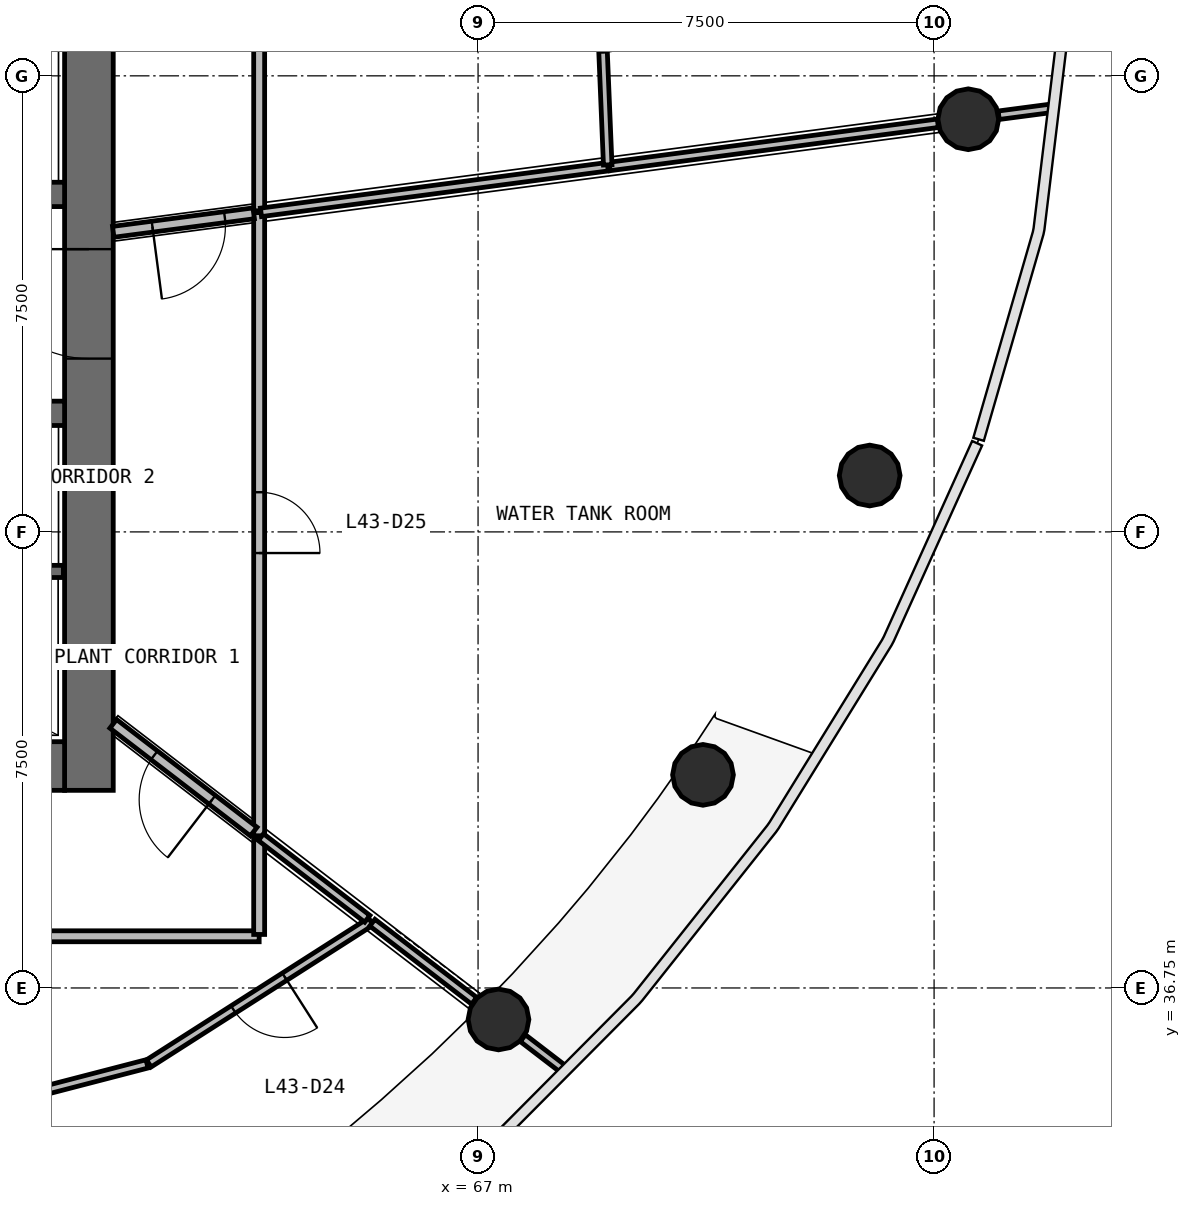
"""IFC4 building model, lengths in metres.
Left out: names, types, materials, properties, quantities, classifications, styles, units other than length and angle.
Written with IfcOpenShell. Run it as: python <this file> out.ifc"""

import sys

from ifc_helpers import new_model, si_unit, direction, frame, frame_2d, origin, origin_2d, place, context, subcontext, project, spatial, rectangle, circle, extrude, source, transform, mapped, element, fill, save


model = new_model("IFC4")
c1 = context("Model", 3, precision=1e-05, world=origin(), true_north=direction((0.0, 1.0)))
c2 = subcontext(c1, "Body", "Model", "MODEL_VIEW")
j1 = project(units=[si_unit("LENGTHUNIT", "METRE"), si_unit("PLANEANGLEUNIT", "RADIAN")], contexts=[c1])
p1 = place(None, origin())
s1 = spatial("IfcSite", under=j1, at=p1, CompositionType="ELEMENT")
p2 = place(p1, origin())
s2 = spatial("IfcBuilding", under=s1, at=p2, CompositionType="ELEMENT")
p3 = place(p2, frame((0.0, 0.0, 179.9)))
s3 = spatial("IfcBuildingStorey", under=s2, at=p3, CompositionType="ELEMENT", Elevation=179.9)
p4 = place(p3, frame((60.6, 40.0, 0.0), z_axis=(0.0, 0.0, 1.0), x_axis=(0.0, 1.0, 0.0)))
e1 = element("IfcWall", 1, at=p4, inside=s3, PredefinedType="SHEAR", context=c2, shape_type="SweptSolid", body=[
    extrude(rectangle(XDim=16.0, YDim=0.8, at=frame_2d((8.0, 0.0))), origin(), (0.0, 0.0, 1.0), 3.9),
])
p5 = place(p4, frame((7.1, 0.0, 0.0)))
e2 = element("IfcOpeningElement", 2, at=p5, cuts=e1, PredefinedType="OPENING", context=c2, shape_type="SweptSolid", body=[
    extrude(rectangle(XDim=1.8, YDim=2.1, at=frame_2d((0.9, 1.05))), frame((0.0, 0.41, 0.0), z_axis=(0.0, -1.0, 0.0), x_axis=(1.0, 0.0, 0.0)), (0.0, 0.0, 1.0), 0.82),
])
p6 = place(p3, frame((43.8, 40.4, 0.0), z_axis=(0.0, 0.0, 1.0), x_axis=(1.0, 0.0, 0.0)))
e3 = element("IfcWall", 3, at=p6, inside=s3, PredefinedType="SHEAR", context=c2, shape_type="SweptSolid", body=[
    extrude(rectangle(XDim=16.4, YDim=0.8, at=frame_2d((8.2, 0.0))), origin(), (0.0, 0.0, 1.0), 3.9),
])
p7 = place(p6, frame((10.1, 0.0, 0.0)))
e4 = element("IfcOpeningElement", 4, at=p7, cuts=e3, PredefinedType="OPENING", context=c2, shape_type="SweptSolid", body=[
    extrude(rectangle(XDim=1.2, YDim=2.1, at=frame_2d((0.6, 1.05))), frame((0.0, 0.41, 0.0), z_axis=(0.0, -1.0, 0.0), x_axis=(1.0, 0.0, 0.0)), (0.0, 0.0, 1.0), 0.82),
])
p8 = place(p6, frame((7.05, 0.0, 0.0)))
e5 = element("IfcOpeningElement", 5, at=p8, cuts=e3, PredefinedType="OPENING", context=c2, shape_type="SweptSolid", body=[
    extrude(rectangle(XDim=1.1, YDim=2.1, at=frame_2d((0.55, 1.05))), frame((0.0, 0.41, 0.0), z_axis=(0.0, -1.0, 0.0), x_axis=(1.0, 0.0, 0.0)), (0.0, 0.0, 1.0), 0.82),
])
p9 = place(p6, frame((0.5, 0.0, 0.0)))
e6 = element("IfcOpeningElement", 6, at=p9, cuts=e3, PredefinedType="OPENING", context=c2, shape_type="SweptSolid", body=[
    extrude(rectangle(XDim=0.8, YDim=2.1, at=frame_2d((0.4, 1.05))), frame((0.0, 0.41, 0.0), z_axis=(0.0, -1.0, 0.0), x_axis=(1.0, 0.0, 0.0)), (0.0, 0.0, 1.0), 0.82),
])
p10 = place(p3, frame((43.8, 49.8, 0.0), z_axis=(0.0, 0.0, 1.0), x_axis=(1.0, 0.0, 0.0)))
e7 = element("IfcWall", 7, at=p10, inside=s3, PredefinedType="SHEAR", context=c2, shape_type="SweptSolid", body=[
    extrude(rectangle(XDim=16.4, YDim=0.4, at=frame_2d((8.2, 0.0))), origin(), (0.0, 0.0, 1.0), 3.9),
])
p11 = place(p10, frame((3.45, 0.0, 0.0)))
e8 = element("IfcOpeningElement", 8, at=p11, cuts=e7, PredefinedType="OPENING", context=c2, shape_type="SweptSolid", body=[
    extrude(rectangle(XDim=0.9, YDim=2.1, at=frame_2d((0.45, 1.05))), frame((0.0, 0.21, 0.0), z_axis=(0.0, -1.0, 0.0), x_axis=(1.0, 0.0, 0.0)), (0.0, 0.0, 1.0), 0.42),
])
p12 = place(p10, frame((7.65, 0.0, 0.0)))
e9 = element("IfcOpeningElement", 9, at=p12, cuts=e7, PredefinedType="OPENING", context=c2, shape_type="SweptSolid", body=[
    extrude(rectangle(XDim=0.9, YDim=2.1, at=frame_2d((0.45, 1.05))), frame((0.0, 0.21, 0.0), z_axis=(0.0, -1.0, 0.0), x_axis=(1.0, 0.0, 0.0)), (0.0, 0.0, 1.0), 0.42),
])
p13 = place(p3, frame((43.8, 46.2, 0.0), z_axis=(0.0, 0.0, 1.0), x_axis=(1.0, 0.0, 0.0)))
e10 = element("IfcWall", 10, at=p13, inside=s3, PredefinedType="SHEAR", context=c2, shape_type="SweptSolid", body=[
    extrude(rectangle(XDim=16.4, YDim=0.4, at=frame_2d((8.2, 0.0))), origin(), (0.0, 0.0, 1.0), 3.9),
])
p14 = place(p13, frame((2.45, 0.0, 0.0)))
e11 = element("IfcOpeningElement", 11, at=p14, cuts=e10, PredefinedType="OPENING", context=c2, shape_type="SweptSolid", body=[
    extrude(rectangle(XDim=0.9, YDim=2.1, at=frame_2d((0.45, 1.05))), frame((0.0, 0.21, 0.0), z_axis=(0.0, -1.0, 0.0), x_axis=(1.0, 0.0, 0.0)), (0.0, 0.0, 1.0), 0.42),
])
p15 = place(p13, frame((7.65, 0.0, 0.0)))
e12 = element("IfcOpeningElement", 12, at=p15, cuts=e10, PredefinedType="OPENING", context=c2, shape_type="SweptSolid", body=[
    extrude(rectangle(XDim=0.9, YDim=2.1, at=frame_2d((0.45, 1.05))), frame((0.0, 0.21, 0.0), z_axis=(0.0, -1.0, 0.0), x_axis=(1.0, 0.0, 0.0)), (0.0, 0.0, 1.0), 0.42),
])
m1 = source(origin(), c2, "Body", "SweptSolid", [
    extrude(circle(Radius=0.5, at=origin_2d()), origin(), (0.0, 0.0, 1.0), 3.58),
])
for number, where, z_axis, x_axis in (
    (13, (75.062, 51.036, 0.0), (0.0, 0.0, 1.0), (1.0, 0.0, 0.0)),
    (14, (67.336, 36.232, 0.0), (0.0, 0.0, 1.0), (1.0, 0.0, 0.0)),
    (15, (70.699, 40.254, 0.0), (0.0, 0.0, 1.0), (1.0, 0.0, 0.0)),
    (16, (73.441, 45.177, 0.0), (0.0, 0.0, 1.0), (1.0, 0.0, 0.0)),
):
    element("IfcColumn", number, at=place(p3, frame(where, z_axis=z_axis, x_axis=x_axis)), inside=s3, PredefinedType="COLUMN", context=c2, shape_type="MappedRepresentation", body=[
        mapped(m1, transform((0.0, 0.0, 0.0), scale=1.0)),
    ])
p16 = place(p3, frame((57.73, 43.6, 0.0), z_axis=(0.0, 0.0, 1.0), x_axis=(1.0, 0.0, 0.0)))
e17 = element("IfcWall", 17, at=p16, inside=s3, PredefinedType="SOLIDWALL", context=c2, shape_type="SweptSolid", body=[
    extrude(rectangle(XDim=2.45, YDim=0.2, at=frame_2d((1.225, 0.0))), origin(), (0.0, 0.0, 1.0), 3.58),
])
p17 = place(p3, frame((63.4, 49.501, 0.0), z_axis=(0.0, 0.0, 1.0), x_axis=(0.0, -1.0, 0.0)))
e18 = element("IfcWall", 18, at=p17, inside=s3, PredefinedType="PARTITIONING", context=c2, shape_type="SweptSolid", body=[
    extrude(rectangle(XDim=10.248, YDim=0.18, at=frame_2d((5.124, 0.0))), origin(), (0.0, 0.0, 1.0), 2.38),
])
p18 = place(p17, frame((4.598, 0.0, 0.0)))
e19 = element("IfcOpeningElement", 19, at=p18, cuts=e18, PredefinedType="OPENING", context=c2, shape_type="SweptSolid", body=[
    extrude(rectangle(XDim=1.0, YDim=2.1, at=frame_2d((0.5, 1.05))), frame((0.0, 0.1, 0.0), z_axis=(0.0, -1.0, 0.0), x_axis=(1.0, 0.0, 0.0)), (0.0, 0.0, 1.0), 0.2),
])
p19 = place(p3, frame((63.4, 37.6, 0.0), z_axis=(0.0, 0.0, 1.0), x_axis=(-1.0, 0.0, 0.0)))
e20 = element("IfcWall", 20, at=p19, inside=s3, PredefinedType="PARTITIONING", context=c2, shape_type="SweptSolid", body=[
    extrude(rectangle(XDim=10.031, YDim=0.18, at=frame_2d((5.015, 0.0))), origin(), (0.0, 0.0, 1.0), 2.38),
])
p20 = place(p19, frame((4.581, 0.0, 0.0)))
e21 = element("IfcOpeningElement", 21, at=p20, cuts=e20, PredefinedType="OPENING", context=c2, shape_type="SweptSolid", body=[
    extrude(rectangle(XDim=1.0, YDim=2.1, at=frame_2d((0.5, 1.05))), frame((0.0, 0.1, 0.0), z_axis=(0.0, -1.0, 0.0), x_axis=(1.0, 0.0, 0.0)), (0.0, 0.0, 1.0), 0.2),
])
p21 = place(p3, frame((63.4, 49.531, 0.0), z_axis=(0.0, 0.0, 1.0), x_axis=(0.0, 1.0, 0.0)))
e22 = element("IfcWall", 22, at=p21, inside=s3, PredefinedType="PARTITIONING", context=c2, shape_type="SweptSolid", body=[
    extrude(rectangle(XDim=8.869, YDim=0.18, at=frame_2d((4.435, 0.0))), origin(), (0.0, 0.0, 1.0), 2.38),
])
p22 = place(p3, frame((63.31, 39.322, 0.0), z_axis=(0.0, 0.0, 1.0), x_axis=(-0.793371480341, 0.608737787706, 0.0)))
e23 = element("IfcWall", 23, at=p22, inside=s3, PredefinedType="PARTITIONING", context=c2, shape_type="SweptSolid", body=[
    extrude(rectangle(XDim=2.912, YDim=0.18, at=frame_2d((1.456, 0.0))), origin(), (0.0, 0.0, 1.0), 2.38),
])
p23 = place(p22, frame((0.862, 0.0, 0.0)))
e24 = element("IfcOpeningElement", 24, at=p23, cuts=e23, PredefinedType="OPENING", context=c2, shape_type="SweptSolid", body=[
    extrude(rectangle(XDim=1.2, YDim=2.1, at=frame_2d((0.6, 1.05))), frame((0.0, 0.1, 0.0), z_axis=(0.0, -1.0, 0.0), x_axis=(1.0, 0.0, 0.0)), (0.0, 0.0, 1.0), 0.2),
])
p24 = place(p3, frame((63.31, 49.489, 0.0), z_axis=(0.0, 0.0, 1.0), x_axis=(-0.991440737811, -0.130557509967, 0.0)))
e25 = element("IfcWall", 25, at=p24, inside=s3, PredefinedType="PARTITIONING", context=c2, shape_type="SweptSolid", body=[
    extrude(rectangle(XDim=2.33, YDim=0.18, at=frame_2d((1.165, 0.0))), origin(), (0.0, 0.0, 1.0), 2.38),
])
p25 = place(p24, frame((0.48, 0.0, 0.0)))
e26 = element("IfcOpeningElement", 26, at=p25, cuts=e25, PredefinedType="OPENING", context=c2, shape_type="SweptSolid", body=[
    extrude(rectangle(XDim=1.2, YDim=2.1, at=frame_2d((0.6, 1.05))), frame((0.0, 0.1, 0.0), z_axis=(0.0, -1.0, 0.0), x_axis=(1.0, 0.0, 0.0)), (0.0, 0.0, 1.0), 0.2),
])
p26 = place(p3, frame((63.4, 37.63, 0.0), z_axis=(0.0, 0.0, 1.0), x_axis=(0.0, 1.0, 0.0)))
e27 = element("IfcWall", 27, at=p26, inside=s3, PredefinedType="PARTITIONING", context=c2, shape_type="SweptSolid", body=[
    extrude(rectangle(XDim=1.593, YDim=0.18, at=frame_2d((0.796, 0.0))), origin(), (0.0, 0.0, 1.0), 2.38),
])
p27 = place(p3, frame((63.43, 49.505, 0.0), z_axis=(0.0, 0.0, 1.0), x_axis=(0.991449239368, 0.130492933744, 0.0)))
e28 = element("IfcWall", 28, at=p27, inside=s3, PredefinedType="PARTITIONING", context=c2, shape_type="SweptSolid", body=[
    extrude(rectangle(XDim=5.753, YDim=0.14, at=frame_2d((2.876, 0.0))), origin(), (0.0, 0.0, 1.0), 2.38),
])
p28 = place(p3, frame((69.163, 50.26, 0.0), z_axis=(0.0, 0.0, 1.0), x_axis=(0.99144696925, 0.130510180315, 0.0)))
e29 = element("IfcWall", 29, at=p28, inside=s3, PredefinedType="PARTITIONING", context=c2, shape_type="SweptSolid", body=[
    extrude(rectangle(XDim=5.446, YDim=0.14, at=frame_2d((2.723, 0.0))), origin(), (0.0, 0.0, 1.0), 2.38),
])
p29 = place(p3, frame((68.938, 54.986, 0.0), z_axis=(0.0, 0.0, 1.0), x_axis=(0.041209574391, -0.999150524685, 0.0)))
e30 = element("IfcWall", 30, at=p29, inside=s3, PredefinedType="PARTITIONING", context=c2, shape_type="SweptSolid", body=[
    extrude(rectangle(XDim=4.704, YDim=0.14, at=frame_2d((2.352, 0.0))), origin(), (0.0, 0.0, 1.0), 2.38),
])
p30 = place(p29, frame((1.854, 0.0, 0.0)))
e31 = element("IfcOpeningElement", 31, at=p30, cuts=e30, PredefinedType="OPENING", context=c2, shape_type="SweptSolid", body=[
    extrude(rectangle(XDim=1.0, YDim=2.1, at=frame_2d((0.5, 1.05))), frame((0.0, 0.08, 0.0), z_axis=(0.0, -1.0, 0.0), x_axis=(1.0, 0.0, 0.0)), (0.0, 0.0, 1.0), 0.16),
])
p31 = place(p3, frame((65.238, 37.842, 0.0), z_axis=(0.0, 0.0, 1.0), x_axis=(-0.842765106191, -0.538281502364, 0.0)))
e32 = element("IfcWall", 32, at=p31, inside=s3, PredefinedType="PARTITIONING", context=c2, shape_type="SweptSolid", body=[
    extrude(rectangle(XDim=4.335, YDim=0.14, at=frame_2d((2.167, 0.0))), origin(), (0.0, 0.0, 1.0), 2.38),
])
p32 = place(p31, frame((1.685, 0.0, 0.0)))
e33 = element("IfcOpeningElement", 33, at=p32, cuts=e32, PredefinedType="OPENING", context=c2, shape_type="SweptSolid", body=[
    extrude(rectangle(XDim=1.0, YDim=2.1, at=frame_2d((0.5, 1.05))), frame((0.0, 0.08, 0.0), z_axis=(0.0, -1.0, 0.0), x_axis=(1.0, 0.0, 0.0)), (0.0, 0.0, 1.0), 0.16),
])
p33 = place(p3, frame((57.602, 34.476, 0.0), z_axis=(0.0, 0.0, 1.0), x_axis=(0.96794524956, 0.251161290518, 0.0)))
e34 = element("IfcWall", 34, at=p33, inside=s3, PredefinedType="PARTITIONING", context=c2, shape_type="SweptSolid", body=[
    extrude(rectangle(XDim=4.084, YDim=0.14, at=frame_2d((2.042, 0.0))), origin(), (0.0, 0.0, 1.0), 2.38),
])
p34 = place(p3, frame((63.429, 39.23, 0.0), z_axis=(0.0, 0.0, 1.0), x_axis=(0.793376463814, -0.608731292662, 0.0)))
e35 = element("IfcWall", 35, at=p34, inside=s3, PredefinedType="PARTITIONING", context=c2, shape_type="SweptSolid", body=[
    extrude(rectangle(XDim=2.206, YDim=0.14, at=frame_2d((1.103, 0.0))), origin(), (0.0, 0.0, 1.0), 2.38),
])
p35 = place(p3, frame((65.262, 37.824, 0.0), z_axis=(0.0, 0.0, 1.0), x_axis=(0.793315822565, -0.608810319942, 0.0)))
e36 = element("IfcWall", 36, at=p35, inside=s3, PredefinedType="PARTITIONING", context=c2, shape_type="SweptSolid", body=[
    extrude(rectangle(XDim=2.111, YDim=0.14, at=frame_2d((1.055, 0.0))), origin(), (0.0, 0.0, 1.0), 2.38),
])
p36 = place(p3, frame((75.562, 51.102, 0.0), z_axis=(0.0, 0.0, 1.0), x_axis=(0.991459985339, 0.130411262827, 0.0)))
e37 = element("IfcWall", 37, at=p36, inside=s3, PredefinedType="PARTITIONING", context=c2, shape_type="SweptSolid", body=[
    extrude(rectangle(XDim=0.876, YDim=0.14, at=frame_2d((0.438, 0.0))), origin(), (0.0, 0.0, 1.0), 2.88),
])
p37 = place(p3, frame((67.737, 35.925, 0.0), z_axis=(0.0, 0.0, 1.0), x_axis=(0.79344724315, -0.608639032873, 0.0)))
e38 = element("IfcWall", 38, at=p37, inside=s3, PredefinedType="PARTITIONING", context=c2, shape_type="SweptSolid", body=[
    extrude(rectangle(XDim=0.815, YDim=0.14, at=frame_2d((0.408, 0.0))), origin(), (0.0, 0.0, 1.0), 2.88),
])
m2 = source(origin(), c2, "Body", "SweptSolid", [
    extrude(rectangle(XDim=1.8, YDim=2.1, at=frame_2d((0.9, 1.05))), frame((0.0, 0.025, 0.0), z_axis=(0.0, -1.0, 0.0), x_axis=(1.0, 0.0, 0.0)), (0.0, 0.0, 1.0), 0.05),
])
p38 = place(p5, origin())
e39 = element("IfcDoor", 39, at=p38, inside=s3, OperationType="SINGLE_SWING_RIGHT", PredefinedType="DOOR", context=c2, shape_type="MappedRepresentation", body=[
    mapped(m2, transform((0.0, 0.0, 0.0), scale=1.0)),
])
fill(e2, e39)
m3 = source(origin(), c2, "Body", "SweptSolid", [
    extrude(rectangle(XDim=1.0, YDim=2.1, at=frame_2d((0.5, 1.05))), frame((0.0, 0.025, 0.0), z_axis=(0.0, -1.0, 0.0), x_axis=(1.0, 0.0, 0.0)), (0.0, 0.0, 1.0), 0.05),
])
p39 = place(p30, origin())
e40 = element("IfcDoor", 40, at=p39, inside=s3, OperationType="SINGLE_SWING_LEFT", PredefinedType="DOOR", context=c2, shape_type="MappedRepresentation", body=[
    mapped(m3, transform((0.0, 0.0, 0.0), scale=1.0)),
])
fill(e31, e40)
p40 = place(p32, origin())
e41 = element("IfcDoor", 41, at=p40, inside=s3, OperationType="SINGLE_SWING_LEFT", PredefinedType="DOOR", context=c2, shape_type="MappedRepresentation", body=[
    mapped(m3, transform((0.0, 0.0, 0.0), scale=1.0)),
])
fill(e33, e41)
p41 = place(p18, origin())
e42 = element("IfcDoor", 42, at=p41, inside=s3, OperationType="SINGLE_SWING_RIGHT", PredefinedType="DOOR", context=c2, shape_type="MappedRepresentation", body=[
    mapped(m3, transform((0.0, 0.0, 0.0), scale=1.0)),
])
fill(e19, e42)
m4 = source(origin(), c2, "Body", "SweptSolid", [
    extrude(rectangle(XDim=1.2, YDim=2.1, at=frame_2d((0.6, 1.05))), frame((0.0, 0.025, 0.0), z_axis=(0.0, -1.0, 0.0), x_axis=(1.0, 0.0, 0.0)), (0.0, 0.0, 1.0), 0.05),
])
p42 = place(p23, origin())
e43 = element("IfcDoor", 43, at=p42, inside=s3, OperationType="SINGLE_SWING_LEFT", PredefinedType="DOOR", context=c2, shape_type="MappedRepresentation", body=[
    mapped(m4, transform((0.0, 0.0, 0.0), scale=1.0)),
])
fill(e24, e43)
p43 = place(p25, origin())
e44 = element("IfcDoor", 44, at=p43, inside=s3, OperationType="SINGLE_SWING_RIGHT", PredefinedType="DOOR", context=c2, shape_type="MappedRepresentation", body=[
    mapped(m4, transform((0.0, 0.0, 0.0), scale=1.0)),
])
fill(e26, e44)
save(model, sys.argv[1])
